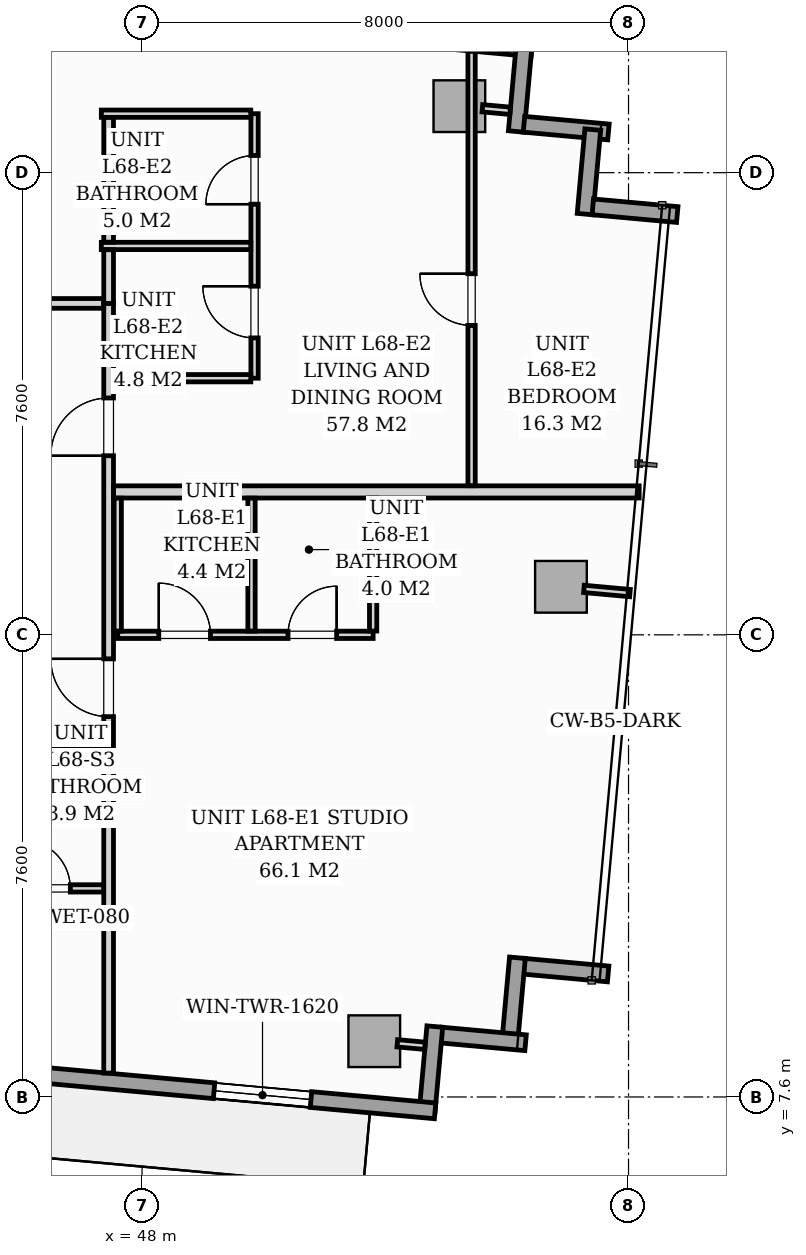
"""IFC4 building model, lengths in metres.
Left out: names, types, materials, properties, quantities, classifications, styles, units other than length and angle.
Written with IfcOpenShell. Run it as: python <this file> out.ifc"""

import sys

from ifc_helpers import new_model, si_unit, direction, frame, frame_2d, origin, origin_2d, place, context, subcontext, project, spatial, rectangle, extrude, source, transform, mapped, element, fill, save


model = new_model("IFC4")
c1 = context("Model", 3, precision=1e-05, world=origin(), true_north=direction((0.0, 1.0)))
c2 = subcontext(c1, "Body", "Model", "MODEL_VIEW")
j1 = project(units=[si_unit("LENGTHUNIT", "METRE"), si_unit("PLANEANGLEUNIT", "RADIAN")], contexts=[c1])
p1 = place(None, origin())
s1 = spatial("IfcSite", under=j1, at=p1, CompositionType="ELEMENT")
p2 = place(p1, origin())
s2 = spatial("IfcBuilding", under=s1, at=p2, CompositionType="ELEMENT")
p3 = place(p2, frame((0.0, 0.0, 236.4)))
s3 = spatial("IfcBuildingStorey", under=s2, at=p3, CompositionType="ELEMENT", Elevation=236.4)
m1 = source(origin(), c2, "Body", "SweptSolid", [
    extrude(rectangle(XDim=0.85, YDim=0.85, at=origin_2d()), origin(), (0.0, 0.0, 1.0), 3.296),
])
for number, where, z_axis, x_axis in (
    (1, (51.819, 8.517, 0.002), (0.0, 0.0, 1.0), (0.996, -0.091, 0.0)),
    (2, (53.218, 23.894, 0.002), (0.0, 0.0, 1.0), (0.996, -0.091, 0.0)),
    (3, (54.889, 15.99, 0.002), (0.0, 0.0, 1.0), (0.996, -0.091, 0.0)),
):
    element("IfcColumn", number, at=place(p3, frame(where, z_axis=z_axis, x_axis=x_axis)), inside=s3, PredefinedType="COLUMN", context=c2, shape_type="MappedRepresentation", body=[
        mapped(m1, transform((0.0, 0.0, 0.0), scale=1.0)),
    ])
p4 = place(p3, frame((39.839, 26.166, 0.0), z_axis=(0.0, 0.0, 1.0), x_axis=(0.995884447498, -0.090632043071, 0.0)))
e4 = element("IfcWall", 4, at=p4, inside=s3, PredefinedType="STANDARD", context=c2, shape_type="SweptSolid", body=[
    extrude(rectangle(XDim=14.63, YDim=0.26, at=frame_2d((7.315, 0.0))), origin(), (0.0, 0.0, 1.0), 3.04),
])
p5 = place(p4, frame((9.0, 0.0, 0.0)))
e5 = element("IfcOpeningElement", 5, at=p5, cuts=e4, PredefinedType="OPENING", context=c2, shape_type="SweptSolid", body=[
    extrude(rectangle(XDim=1.8, YDim=2.06, at=frame_2d((0.9, 1.03))), frame((0.0, 0.14, 0.0), z_axis=(0.0, -1.0, 0.0), x_axis=(1.0, 0.0, 0.0)), (0.0, 0.0, 1.0), 0.28),
])
p6 = place(p4, frame((0.7, 0.0, 0.65)))
e6 = element("IfcOpeningElement", 6, at=p6, cuts=e4, PredefinedType="OPENING", context=c2, shape_type="SweptSolid", body=[
    extrude(rectangle(XDim=1.6, YDim=1.5, at=frame_2d((0.8, 0.75))), frame((0.0, 0.14, 0.0), z_axis=(0.0, -1.0, 0.0), x_axis=(1.0, 0.0, 0.0)), (0.0, 0.0, 1.0), 0.28),
])
p7 = place(p3, frame((54.281, 24.866, 0.0), z_axis=(0.0, 0.0, 1.0), x_axis=(-0.090661991521, -0.995881721538, 0.0)))
e7 = element("IfcWall", 7, at=p7, inside=s3, PredefinedType="STANDARD", context=c2, shape_type="SweptSolid", body=[
    extrude(rectangle(XDim=1.395, YDim=0.26, at=frame_2d((0.698, 0.0))), origin(), (0.0, 0.0, 1.0), 3.04),
])
for number, where, z_axis, x_axis in (
    (8, (54.281, 23.596, 0.0), (0.0, 0.0, 1.0), (0.996, -0.091, 0.0)),
    (9, (55.412, 23.508, 0.0), (0.0, 0.0, 1.0), (-0.091, -0.996, 0.0)),
    (10, (55.412, 22.238, 0.0), (0.0, 0.0, 1.0), (0.996, -0.091, 0.0)),
):
    element("IfcWall", number, at=place(p3, frame(where, z_axis=z_axis, x_axis=x_axis)), inside=s3, PredefinedType="STANDARD", context=c2, shape_type="SweptSolid", body=[
        extrude(rectangle(XDim=1.395, YDim=0.26, at=frame_2d((0.698, 0.0))), origin(), (0.0, 0.0, 1.0), 3.04),
    ])
for number, where, z_axis, x_axis in (
    (11, (55.665, 9.623, 0.0), (0.0, 0.0, 1.0), (-0.996, 0.091, 0.0)),
    (12, (54.173, 9.889, 0.0), (0.0, 0.0, 1.0), (-0.091, -0.996, 0.0)),
):
    element("IfcWall", number, at=place(p3, frame(where, z_axis=z_axis, x_axis=x_axis)), inside=s3, PredefinedType="STANDARD", context=c2, shape_type="SweptSolid", body=[
        extrude(rectangle(XDim=1.395, YDim=0.26, at=frame_2d((0.698, 0.0))), origin(), (0.0, 0.0, 1.0), 3.04),
    ])
for number, where, z_axis, x_axis in (
    (13, (54.307, 8.492, 0.0), (0.0, 0.0, 1.0), (-0.996, 0.091, 0.0)),
    (14, (52.815, 8.758, 0.0), (0.0, 0.0, 1.0), (-0.091, -0.996, 0.0)),
):
    element("IfcWall", number, at=place(p3, frame(where, z_axis=z_axis, x_axis=x_axis)), inside=s3, PredefinedType="STANDARD", context=c2, shape_type="SweptSolid", body=[
        extrude(rectangle(XDim=1.395, YDim=0.26, at=frame_2d((0.698, 0.0))), origin(), (0.0, 0.0, 1.0), 3.04),
    ])
p8 = place(p3, frame((52.819, 7.372, 0.0), z_axis=(0.0, 0.0, 1.0), x_axis=(-0.995884447498, 0.090632043071, 0.0)))
e15 = element("IfcWall", 15, at=p8, inside=s3, PredefinedType="STANDARD", context=c2, shape_type="SweptSolid", body=[
    extrude(rectangle(XDim=14.63, YDim=0.26, at=frame_2d((7.315, 0.0))), origin(), (0.0, 0.0, 1.0), 3.04),
])
p9 = place(p8, frame((6.865, 0.0, 0.0)))
e16 = element("IfcOpeningElement", 16, at=p9, cuts=e15, PredefinedType="OPENING", context=c2, shape_type="SweptSolid", body=[
    extrude(rectangle(XDim=1.8, YDim=2.06, at=frame_2d((0.9, 1.03))), frame((0.0, 0.14, 0.0), z_axis=(0.0, -1.0, 0.0), x_axis=(1.0, 0.0, 0.0)), (0.0, 0.0, 1.0), 0.28),
])
p10 = place(p8, frame((2.05, 0.0, 0.65)))
e17 = element("IfcOpeningElement", 17, at=p10, cuts=e15, PredefinedType="OPENING", context=c2, shape_type="SweptSolid", body=[
    extrude(rectangle(XDim=1.6, YDim=1.5, at=frame_2d((0.8, 0.75))), frame((0.0, 0.14, 0.0), z_axis=(0.0, -1.0, 0.0), x_axis=(1.0, 0.0, 0.0)), (0.0, 0.0, 1.0), 0.28),
])
p11 = place(p3, frame((26.12, 13.28, 0.0), z_axis=(0.0, 0.0, 1.0), x_axis=(1.0, 0.0, 0.0)))
e18 = element("IfcWall", 18, at=p11, inside=s3, PredefinedType="PARTITIONING", context=c2, shape_type="SweptSolid", body=[
    extrude(rectangle(XDim=21.33, YDim=0.16, at=frame_2d((10.665, 0.0))), origin(), (0.0, 0.0, 1.0), 2.597),
])
p12 = place(p11, frame((4.704, 0.0, 0.0)))
e19 = element("IfcOpeningElement", 19, at=p12, cuts=e18, PredefinedType="OPENING", context=c2, shape_type="SweptSolid", body=[
    extrude(rectangle(XDim=0.95, YDim=2.06, at=frame_2d((0.475, 1.03))), frame((0.0, 0.09, 0.0), z_axis=(0.0, -1.0, 0.0), x_axis=(1.0, 0.0, 0.0)), (0.0, 0.0, 1.0), 0.18),
])
p13 = place(p11, frame((7.5, 0.0, 0.0)))
e20 = element("IfcOpeningElement", 20, at=p13, cuts=e18, PredefinedType="OPENING", context=c2, shape_type="SweptSolid", body=[
    extrude(rectangle(XDim=0.95, YDim=2.06, at=frame_2d((0.475, 1.03))), frame((0.0, 0.09, 0.0), z_axis=(0.0, -1.0, 0.0), x_axis=(1.0, 0.0, 0.0)), (0.0, 0.0, 1.0), 0.18),
])
p14 = place(p11, frame((14.976, 0.0, 0.0)))
e21 = element("IfcOpeningElement", 21, at=p14, cuts=e18, PredefinedType="OPENING", context=c2, shape_type="SweptSolid", body=[
    extrude(rectangle(XDim=0.95, YDim=2.06, at=frame_2d((0.475, 1.03))), frame((0.0, 0.09, 0.0), z_axis=(0.0, -1.0, 0.0), x_axis=(1.0, 0.0, 0.0)), (0.0, 0.0, 1.0), 0.18),
])
p15 = place(p3, frame((47.45, 7.993, 0.0), z_axis=(0.0, 0.0, 1.0), x_axis=(0.0, 1.0, 0.0)))
e22 = element("IfcWall", 22, at=p15, inside=s3, PredefinedType="PARTITIONING", context=c2, shape_type="SweptSolid", body=[
    extrude(rectangle(XDim=5.205, YDim=0.16, at=frame_2d((2.603, 0.0))), origin(), (0.0, 0.0, 1.0), 3.04),
])
p16 = place(p3, frame((47.45, 13.362, 0.0), z_axis=(0.0, 0.0, 1.0), x_axis=(0.0, 1.0, 0.0)))
e23 = element("IfcWall", 23, at=p16, inside=s3, PredefinedType="PARTITIONING", context=c2, shape_type="SweptSolid", body=[
    extrude(rectangle(XDim=7.288, YDim=0.16, at=frame_2d((3.644, 0.0))), origin(), (0.0, 0.0, 1.0), 3.04),
])
p17 = place(p16, frame((0.493, 0.0, 0.0)))
e24 = element("IfcOpeningElement", 24, at=p17, cuts=e23, PredefinedType="OPENING", context=c2, shape_type="SweptSolid", body=[
    extrude(rectangle(XDim=0.95, YDim=2.06, at=frame_2d((0.475, 1.03))), frame((0.0, 0.09, 0.0), z_axis=(0.0, -1.0, 0.0), x_axis=(1.0, 0.0, 0.0)), (0.0, 0.0, 1.0), 0.18),
])
p18 = place(p16, frame((4.783, 0.0, 0.0)))
e25 = element("IfcOpeningElement", 25, at=p18, cuts=e23, PredefinedType="OPENING", context=c2, shape_type="SweptSolid", body=[
    extrude(rectangle(XDim=0.95, YDim=2.06, at=frame_2d((0.475, 1.03))), frame((0.0, 0.09, 0.0), z_axis=(0.0, -1.0, 0.0), x_axis=(1.0, 0.0, 0.0)), (0.0, 0.0, 1.0), 0.18),
])
p19 = place(p3, frame((45.802, 20.65, 0.0), z_axis=(0.0, 0.0, 1.0), x_axis=(1.0, 0.0, 0.0)))
e26 = element("IfcWall", 26, at=p19, inside=s3, PredefinedType="PARTITIONING", context=c2, shape_type="SweptSolid", body=[
    extrude(rectangle(XDim=1.566, YDim=0.16, at=frame_2d((0.783, 0.0))), origin(), (0.0, 0.0, 1.0), 3.04),
])
p20 = place(p3, frame((43.27, 11.03, 0.0), z_axis=(0.0, 0.0, 1.0), x_axis=(1.0, 0.0, 0.0)))
e27 = element("IfcWall", 27, at=p20, inside=s3, PredefinedType="PARTITIONING", context=c2, shape_type="SweptSolid", body=[
    extrude(rectangle(XDim=4.098, YDim=0.12, at=frame_2d((2.049, 0.0))), origin(), (0.0, 0.0, 1.0), 3.04),
])
p21 = place(p20, frame((0.675, 0.0, 0.0)))
e28 = element("IfcOpeningElement", 28, at=p21, cuts=e27, PredefinedType="OPENING", context=c2, shape_type="SweptSolid", body=[
    extrude(rectangle(XDim=0.85, YDim=2.05, at=frame_2d((0.425, 1.025))), frame((0.0, 0.07, 0.0), z_axis=(0.0, -1.0, 0.0), x_axis=(1.0, 0.0, 0.0)), (0.0, 0.0, 1.0), 0.14),
])
p22 = place(p20, frame((2.75, 0.0, 0.0)))
e29 = element("IfcOpeningElement", 29, at=p22, cuts=e27, PredefinedType="OPENING", context=c2, shape_type="SweptSolid", body=[
    extrude(rectangle(XDim=0.8, YDim=2.02, at=frame_2d((0.4, 1.01))), frame((0.0, 0.07, 0.0), z_axis=(0.0, -1.0, 0.0), x_axis=(1.0, 0.0, 0.0)), (0.0, 0.0, 1.0), 0.14),
])
p23 = place(p3, frame((47.532, 17.55, 0.0), z_axis=(0.0, 0.0, 1.0), x_axis=(1.0, 0.0, 0.0)))
e30 = element("IfcWall", 30, at=p23, inside=s3, PredefinedType="PARTITIONING", context=c2, shape_type="SweptSolid", body=[
    extrude(rectangle(XDim=8.643, YDim=0.2, at=frame_2d((4.322, 0.0))), origin(), (0.0, 0.0, 1.0), 3.04),
])
p24 = place(p3, frame((47.6, 15.2, 0.0), z_axis=(0.0, 0.0, 1.0), x_axis=(1.0, 0.0, 0.0)))
e31 = element("IfcWall", 31, at=p24, inside=s3, PredefinedType="PARTITIONING", context=c2, shape_type="SweptSolid", body=[
    extrude(rectangle(XDim=4.2, YDim=0.12, at=frame_2d((2.1, 0.0))), origin(), (0.0, 0.0, 1.0), 3.04),
])
p25 = place(p24, frame((0.675, 0.0, 0.0)))
e32 = element("IfcOpeningElement", 32, at=p25, cuts=e31, PredefinedType="OPENING", context=c2, shape_type="SweptSolid", body=[
    extrude(rectangle(XDim=0.85, YDim=2.05, at=frame_2d((0.425, 1.025))), frame((0.0, 0.07, 0.0), z_axis=(0.0, -1.0, 0.0), x_axis=(1.0, 0.0, 0.0)), (0.0, 0.0, 1.0), 0.14),
])
p26 = place(p24, frame((2.8, 0.0, 0.0)))
e33 = element("IfcOpeningElement", 33, at=p26, cuts=e31, PredefinedType="OPENING", context=c2, shape_type="SweptSolid", body=[
    extrude(rectangle(XDim=0.8, YDim=2.02, at=frame_2d((0.4, 1.01))), frame((0.0, 0.07, 0.0), z_axis=(0.0, -1.0, 0.0), x_axis=(1.0, 0.0, 0.0)), (0.0, 0.0, 1.0), 0.14),
])
for number, where, z_axis, x_axis in (
    (34, (47.6, 15.262, 0.0), (0.0, 0.0, 1.0), (0.0, 1.0, 0.0)),
    (35, (49.8, 15.262, 0.0), (0.0, 0.0, 1.0), (0.0, 1.0, 0.0)),
    (36, (51.8, 15.262, 0.0), (0.0, 0.0, 1.0), (0.0, 1.0, 0.0)),
):
    element("IfcWall", number, at=place(p3, frame(where, z_axis=z_axis, x_axis=x_axis)), inside=s3, PredefinedType="PARTITIONING", context=c2, shape_type="SweptSolid", body=[
        extrude(rectangle(XDim=2.186, YDim=0.12, at=frame_2d((1.093, 0.0))), origin(), (0.0, 0.0, 1.0), 3.04),
    ])
p27 = place(p3, frame((49.85, 19.42, 0.0), z_axis=(0.0, 0.0, 1.0), x_axis=(0.0, 1.0, 0.0)))
e37 = element("IfcWall", 37, at=p27, inside=s3, PredefinedType="PARTITIONING", context=c2, shape_type="SweptSolid", body=[
    extrude(rectangle(XDim=4.35, YDim=0.12, at=frame_2d((2.175, 0.0))), origin(), (0.0, 0.0, 1.0), 3.04),
])
p28 = place(p27, frame((0.663, 0.0, 0.0)))
e38 = element("IfcOpeningElement", 38, at=p28, cuts=e37, PredefinedType="OPENING", context=c2, shape_type="SweptSolid", body=[
    extrude(rectangle(XDim=0.85, YDim=2.05, at=frame_2d((0.425, 1.025))), frame((0.0, 0.07, 0.0), z_axis=(0.0, -1.0, 0.0), x_axis=(1.0, 0.0, 0.0)), (0.0, 0.0, 1.0), 0.14),
])
p29 = place(p27, frame((2.862, 0.0, 0.0)))
e39 = element("IfcOpeningElement", 39, at=p29, cuts=e37, PredefinedType="OPENING", context=c2, shape_type="SweptSolid", body=[
    extrude(rectangle(XDim=0.8, YDim=2.02, at=frame_2d((0.4, 1.01))), frame((0.0, 0.07, 0.0), z_axis=(0.0, -1.0, 0.0), x_axis=(1.0, 0.0, 0.0)), (0.0, 0.0, 1.0), 0.14),
])
p30 = place(p3, frame((47.33, 21.595, 0.0), z_axis=(0.0, 0.0, 1.0), x_axis=(1.0, 0.0, 0.0)))
e40 = element("IfcWall", 40, at=p30, inside=s3, PredefinedType="PARTITIONING", context=c2, shape_type="SweptSolid", body=[
    extrude(rectangle(XDim=2.458, YDim=0.12, at=frame_2d((1.229, 0.0))), origin(), (0.0, 0.0, 1.0), 3.04),
])
p31 = place(p3, frame((47.532, 19.42, 0.0), z_axis=(0.0, 0.0, 1.0), x_axis=(1.0, 0.0, 0.0)))
e41 = element("IfcWall", 41, at=p31, inside=s3, PredefinedType="PARTITIONING", context=c2, shape_type="SweptSolid", body=[
    extrude(rectangle(XDim=2.256, YDim=0.12, at=frame_2d((1.128, 0.0))), origin(), (0.0, 0.0, 1.0), 3.04),
])
p32 = place(p3, frame((47.33, 23.77, 0.0), z_axis=(0.0, 0.0, 1.0), x_axis=(1.0, 0.0, 0.0)))
e42 = element("IfcWall", 42, at=p32, inside=s3, PredefinedType="PARTITIONING", context=c2, shape_type="SweptSolid", body=[
    extrude(rectangle(XDim=2.458, YDim=0.12, at=frame_2d((1.229, 0.0))), origin(), (0.0, 0.0, 1.0), 3.04),
])
p33 = place(p3, frame((47.45, 20.65, 0.0), z_axis=(0.0, 0.0, 1.0), x_axis=(0.0, 1.0, 0.0)))
e43 = element("IfcWall", 43, at=p33, inside=s3, PredefinedType="PARTITIONING", context=c2, shape_type="SweptSolid", body=[
    extrude(rectangle(XDim=0.883, YDim=0.16, at=frame_2d((0.441, 0.0))), origin(), (0.0, 0.0, 1.0), 3.04),
])
p34 = place(p3, frame((47.45, 21.657, 0.0), z_axis=(0.0, 0.0, 1.0), x_axis=(0.0, 1.0, 0.0)))
e44 = element("IfcWall", 44, at=p34, inside=s3, PredefinedType="PARTITIONING", context=c2, shape_type="SweptSolid", body=[
    extrude(rectangle(XDim=2.051, YDim=0.16, at=frame_2d((1.025, 0.0))), origin(), (0.0, 0.0, 1.0), 3.04),
])
p35 = place(p3, frame((53.419, 17.652, 0.0), z_axis=(0.0, 0.0, 1.0), x_axis=(0.0, 1.0, 0.0)))
e45 = element("IfcWall", 45, at=p35, inside=s3, PredefinedType="PARTITIONING", context=c2, shape_type="SweptSolid", body=[
    extrude(rectangle(XDim=7.145, YDim=0.12, at=frame_2d((3.573, 0.0))), origin(), (0.0, 0.0, 1.0), 2.483),
])
p36 = place(p35, frame((2.636, 0.0, 0.0)))
e46 = element("IfcOpeningElement", 46, at=p36, cuts=e45, PredefinedType="OPENING", context=c2, shape_type="SweptSolid", body=[
    extrude(rectangle(XDim=0.85, YDim=2.05, at=frame_2d((0.425, 1.025))), frame((0.0, 0.07, 0.0), z_axis=(0.0, -1.0, 0.0), x_axis=(1.0, 0.0, 0.0)), (0.0, 0.0, 1.0), 0.14),
])
for number, where, z_axis, x_axis in (
    (47, (52.197, 8.483, 0.0), (0.0, 0.0, 1.0), (0.996, -0.091, 0.0)),
    (48, (53.597, 23.859, 0.0), (0.0, 0.0, 1.0), (0.996, -0.091, 0.0)),
):
    element("IfcWall", number, at=place(p3, frame(where, z_axis=z_axis, x_axis=x_axis)), inside=s3, PredefinedType="PARTITIONING", context=c2, shape_type="SweptSolid", body=[
        extrude(rectangle(XDim=0.458, YDim=0.12, at=frame_2d((0.229, 0.0))), origin(), (0.0, 0.0, 1.0), 3.04),
    ])
p37 = place(p3, frame((55.267, 15.955, 0.0), z_axis=(0.0, 0.0, 1.0), x_axis=(0.995887938321, -0.09059367697, 0.0)))
e49 = element("IfcWall", 49, at=p37, inside=s3, PredefinedType="PARTITIONING", context=c2, shape_type="SweptSolid", body=[
    extrude(rectangle(XDim=0.76, YDim=0.12, at=frame_2d((0.38, 0.0))), origin(), (0.0, 0.0, 1.0), 3.04),
])
m2 = source(origin(), c2, "Body", "SweptSolid", [
    extrude(rectangle(XDim=1.6, YDim=1.5, at=frame_2d((0.8, 0.75))), frame((0.0, 0.03, 0.0), z_axis=(0.0, -1.0, 0.0), x_axis=(1.0, 0.0, 0.0)), (0.0, 0.0, 1.0), 0.06),
])
p38 = place(p10, origin())
e50 = element("IfcWindow", 50, at=p38, inside=s3, PartitioningType="SINGLE_PANEL", PredefinedType="WINDOW", context=c2, shape_type="MappedRepresentation", body=[
    mapped(m2, transform((0.0, 0.0, 0.0), scale=1.0)),
])
fill(e17, e50)
m3 = source(origin(), c2, "Body", "SweptSolid", [
    extrude(rectangle(XDim=0.8, YDim=2.02, at=frame_2d((0.4, 1.01))), frame((0.0, 0.025, 0.0), z_axis=(0.0, -1.0, 0.0), x_axis=(1.0, 0.0, 0.0)), (0.0, 0.0, 1.0), 0.05),
])
p39 = place(p22, origin())
e51 = element("IfcDoor", 51, at=p39, inside=s3, OperationType="SINGLE_SWING_LEFT", PredefinedType="DOOR", context=c2, shape_type="MappedRepresentation", body=[
    mapped(m3, transform((0.0, 0.0, 0.0), scale=1.0)),
])
fill(e29, e51)
m4 = source(origin(), c2, "Body", "SweptSolid", [
    extrude(rectangle(XDim=0.95, YDim=2.06, at=frame_2d((0.475, 1.03))), frame((0.0, 0.025, 0.0), z_axis=(0.0, -1.0, 0.0), x_axis=(1.0, 0.0, 0.0)), (0.0, 0.0, 1.0), 0.05),
])
p40 = place(p17, origin())
e52 = element("IfcDoor", 52, at=p40, inside=s3, OperationType="SINGLE_SWING_RIGHT", PredefinedType="DOOR", context=c2, shape_type="MappedRepresentation", body=[
    mapped(m4, transform((0.0, 0.0, 0.0), scale=1.0)),
])
fill(e24, e52)
m5 = source(origin(), c2, "Body", "SweptSolid", [
    extrude(rectangle(XDim=0.85, YDim=2.05, at=frame_2d((0.425, 1.025))), frame((0.0, 0.025, 0.0), z_axis=(0.0, -1.0, 0.0), x_axis=(1.0, 0.0, 0.0)), (0.0, 0.0, 1.0), 0.05),
])
p41 = place(p25, origin())
e53 = element("IfcDoor", 53, at=p41, inside=s3, OperationType="SINGLE_SWING_LEFT", PredefinedType="DOOR", context=c2, shape_type="MappedRepresentation", body=[
    mapped(m5, transform((0.0, 0.0, 0.0), scale=1.0)),
])
fill(e32, e53)
p42 = place(p26, origin())
e54 = element("IfcDoor", 54, at=p42, inside=s3, OperationType="SINGLE_SWING_RIGHT", PredefinedType="DOOR", context=c2, shape_type="MappedRepresentation", body=[
    mapped(m3, transform((0.0, 0.0, 0.0), scale=1.0)),
])
fill(e33, e54)
p43 = place(p18, origin())
e55 = element("IfcDoor", 55, at=p43, inside=s3, OperationType="SINGLE_SWING_LEFT", PredefinedType="DOOR", context=c2, shape_type="MappedRepresentation", body=[
    mapped(m4, transform((0.0, 0.0, 0.0), scale=1.0)),
])
fill(e25, e55)
p44 = place(p28, origin())
e56 = element("IfcDoor", 56, at=p44, inside=s3, OperationType="SINGLE_SWING_RIGHT", PredefinedType="DOOR", context=c2, shape_type="MappedRepresentation", body=[
    mapped(m5, transform((0.0, 0.0, 0.0), scale=1.0)),
])
fill(e38, e56)
p45 = place(p29, origin())
e57 = element("IfcDoor", 57, at=p45, inside=s3, OperationType="SINGLE_SWING_LEFT", PredefinedType="DOOR", context=c2, shape_type="MappedRepresentation", body=[
    mapped(m3, transform((0.0, 0.0, 0.0), scale=1.0)),
])
fill(e39, e57)
p46 = place(p36, origin())
e58 = element("IfcDoor", 58, at=p46, inside=s3, OperationType="SINGLE_SWING_RIGHT", PredefinedType="DOOR", context=c2, shape_type="MappedRepresentation", body=[
    mapped(m5, transform((0.0, 0.0, 0.0), scale=1.0)),
])
fill(e46, e58)
save(model, sys.argv[1])
